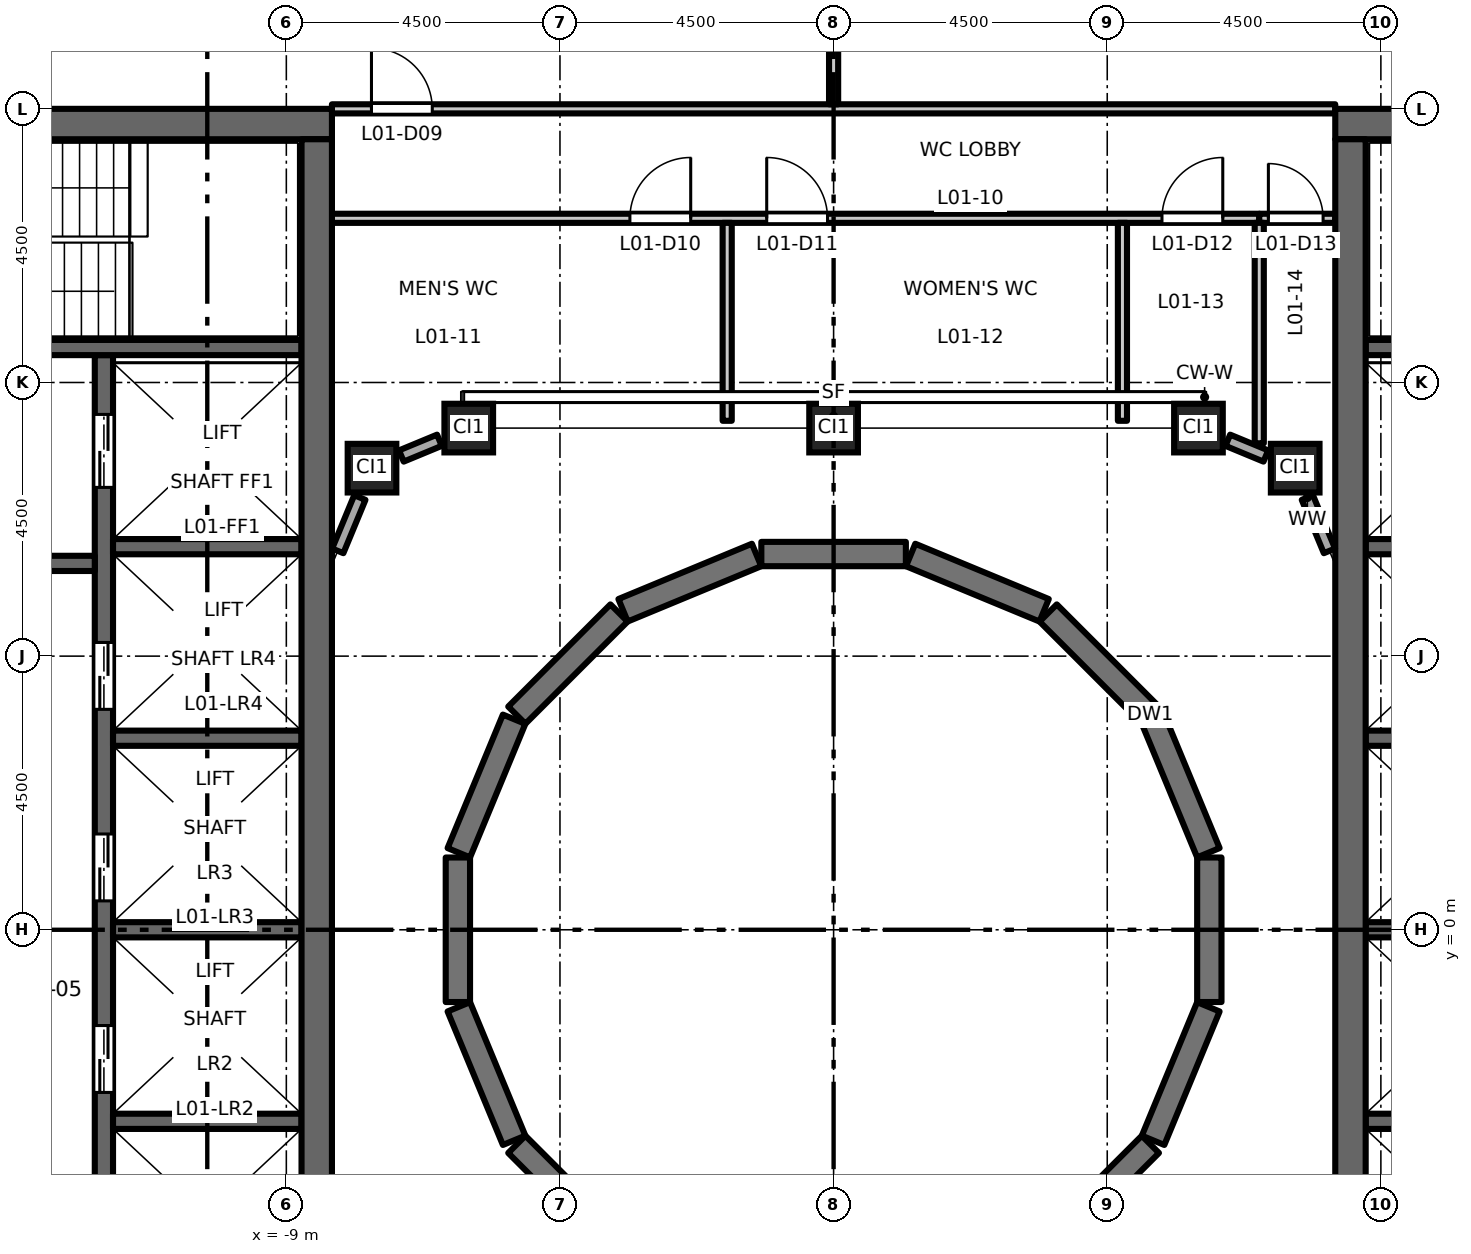
"""IFC4 building model, lengths in metres.
Left out: names, types, materials, properties, quantities, classifications, styles, units other than length and angle.
Written with IfcOpenShell. Run it as: python <this file> out.ifc"""

import sys

from ifc_helpers import new_model, si_unit, direction, frame, frame_2d, origin, origin_2d, place, context, subcontext, project, spatial, rectangle, hollow_rectangle, extrude, element, fill, save


model = new_model("IFC4")
c1 = context("Model", 3, precision=1e-05, world=origin(), true_north=direction((0.0, 1.0)))
c2 = subcontext(c1, "Body", "Model", "MODEL_VIEW")
j1 = project(units=[si_unit("LENGTHUNIT", "METRE"), si_unit("PLANEANGLEUNIT", "RADIAN")], contexts=[c1])
p1 = place(None, origin())
s1 = spatial("IfcSite", under=j1, at=p1, CompositionType="ELEMENT")
p2 = place(p1, origin())
s2 = spatial("IfcBuilding", under=s1, at=p2, CompositionType="ELEMENT")
p3 = place(p2, frame((0.0, 0.0, 7.2)))
s3 = spatial("IfcBuildingStorey", under=s2, at=p3, CompositionType="ELEMENT", Elevation=7.2)
for number, where, z_axis, x_axis in (
    (1, (-7.591, 7.591, 0.0), (0.0, 0.0, 1.0), (1.0, 0.0, 0.0)),
    (2, (-6.0, 8.25, 0.0), (0.0, 0.0, 1.0), (1.0, 0.0, 0.0)),
    (3, (0.0, 8.25, 0.0), (0.0, 0.0, 1.0), (1.0, 0.0, 0.0)),
    (4, (6.0, 8.25, 0.0), (0.0, 0.0, 1.0), (1.0, 0.0, 0.0)),
    (5, (7.591, 7.591, 0.0), (0.0, 0.0, 1.0), (1.0, 0.0, 0.0)),
):
    element("IfcColumn", number, at=place(p3, frame(where, z_axis=z_axis, x_axis=x_axis)), inside=s3, PredefinedType="COLUMN", context=c2, shape_type="SweptSolid", body=[
        extrude(hollow_rectangle(XDim=0.8, YDim=0.8, WallThickness=0.05, at=origin_2d()), origin(), (0.0, 0.0, 1.0), 5.0),
    ])
p4 = place(p3, frame((-12.0, -9.45, 0.0), z_axis=(0.0, 0.0, 1.0), x_axis=(0.0, 1.0, 0.0)))
e6 = element("IfcWall", 6, at=p4, inside=s3, PredefinedType="SHEAR", context=c2, shape_type="SweptSolid", body=[
    extrude(rectangle(XDim=18.9, YDim=0.3, at=frame_2d((9.45, 0.0))), origin(), (0.0, 0.0, 1.0), 4.8),
])
p5 = place(p4, frame((3.625, 0.0, 0.0)))
e7 = element("IfcOpeningElement", 7, at=p5, cuts=e6, PredefinedType="OPENING", context=c2, shape_type="SweptSolid", body=[
    extrude(rectangle(XDim=1.1, YDim=2.1, at=frame_2d((0.55, 1.05))), frame((0.0, 0.16, 0.0), z_axis=(0.0, -1.0, 0.0), x_axis=(1.0, 0.0, 0.0)), (0.0, 0.0, 1.0), 0.32),
])
p6 = place(p4, frame((6.775, 0.0, 0.0)))
e8 = element("IfcOpeningElement", 8, at=p6, cuts=e6, PredefinedType="OPENING", context=c2, shape_type="SweptSolid", body=[
    extrude(rectangle(XDim=1.1, YDim=2.1, at=frame_2d((0.55, 1.05))), frame((0.0, 0.16, 0.0), z_axis=(0.0, -1.0, 0.0), x_axis=(1.0, 0.0, 0.0)), (0.0, 0.0, 1.0), 0.32),
])
p7 = place(p4, frame((9.925, 0.0, 0.0)))
e9 = element("IfcOpeningElement", 9, at=p7, cuts=e6, PredefinedType="OPENING", context=c2, shape_type="SweptSolid", body=[
    extrude(rectangle(XDim=1.1, YDim=2.1, at=frame_2d((0.55, 1.05))), frame((0.0, 0.16, 0.0), z_axis=(0.0, -1.0, 0.0), x_axis=(1.0, 0.0, 0.0)), (0.0, 0.0, 1.0), 0.32),
])
p8 = place(p4, frame((13.075, 0.0, 0.0)))
e10 = element("IfcOpeningElement", 10, at=p8, cuts=e6, PredefinedType="OPENING", context=c2, shape_type="SweptSolid", body=[
    extrude(rectangle(XDim=1.1, YDim=2.1, at=frame_2d((0.55, 1.05))), frame((0.0, 0.16, 0.0), z_axis=(0.0, -1.0, 0.0), x_axis=(1.0, 0.0, 0.0)), (0.0, 0.0, 1.0), 0.32),
])
p9 = place(p4, frame((16.725, 0.0, 0.0)))
e11 = element("IfcOpeningElement", 11, at=p9, cuts=e6, PredefinedType="OPENING", context=c2, shape_type="SweptSolid", body=[
    extrude(rectangle(XDim=1.2, YDim=2.1, at=frame_2d((0.6, 1.05))), frame((0.0, 0.16, 0.0), z_axis=(0.0, -1.0, 0.0), x_axis=(1.0, 0.0, 0.0)), (0.0, 0.0, 1.0), 0.32),
])
p10 = place(p4, frame((0.975, 0.0, 0.0)))
e12 = element("IfcOpeningElement", 12, at=p10, cuts=e6, PredefinedType="OPENING", context=c2, shape_type="SweptSolid", body=[
    extrude(rectangle(XDim=1.2, YDim=2.1, at=frame_2d((0.6, 1.05))), frame((0.0, 0.16, 0.0), z_axis=(0.0, -1.0, 0.0), x_axis=(1.0, 0.0, 0.0)), (0.0, 0.0, 1.0), 0.32),
])
p11 = place(p3, frame((-12.15, 6.025, 0.0), z_axis=(0.0, 0.0, 1.0), x_axis=(-1.0, 0.0, 0.0)))
e13 = element("IfcWall", 13, at=p11, inside=s3, PredefinedType="SHEAR", context=c2, shape_type="SweptSolid", body=[
    extrude(rectangle(XDim=4.6, YDim=0.25, at=frame_2d((2.3, 0.0))), origin(), (0.0, 0.0, 1.0), 4.8),
])
p12 = place(p11, frame((1.8, 0.0, 0.0)))
e14 = element("IfcOpeningElement", 14, at=p12, cuts=e13, PredefinedType="OPENING", context=c2, shape_type="SweptSolid", body=[
    extrude(rectangle(XDim=1.0, YDim=2.1, at=frame_2d((0.5, 1.05))), frame((0.0, 0.135, 0.0), z_axis=(0.0, -1.0, 0.0), x_axis=(1.0, 0.0, 0.0)), (0.0, 0.0, 1.0), 0.27),
])
for number, where, z_axis, x_axis in (
    (15, (-8.75, 0.0, 0.0), (0.0, 0.0, 1.0), (-1.0, 0.0, 0.0)),
    (16, (-8.75, 3.15, 0.0), (0.0, 0.0, 1.0), (-1.0, 0.0, 0.0)),
    (17, (-8.75, 6.3, 0.0), (0.0, 0.0, 1.0), (-1.0, 0.0, 0.0)),
    (18, (-8.75, -3.15, 0.0), (0.0, 0.0, 1.0), (-1.0, 0.0, 0.0)),
):
    element("IfcWall", number, at=place(p3, frame(where, z_axis=z_axis, x_axis=x_axis)), inside=s3, PredefinedType="SHEAR", context=c2, shape_type="SweptSolid", body=[
        extrude(rectangle(XDim=3.1, YDim=0.25, at=frame_2d((1.55, 0.0))), origin(), (0.0, 0.0, 1.0), 4.8),
    ])
p13 = place(p3, frame((-8.75, 9.575, 0.0), z_axis=(0.0, 0.0, 1.0), x_axis=(-1.0, 0.0, 0.0)))
e19 = element("IfcWall", 19, at=p13, inside=s3, PredefinedType="SHEAR", context=c2, shape_type="SweptSolid", body=[
    extrude(rectangle(XDim=8.0, YDim=0.25, at=frame_2d((4.0, 0.0))), origin(), (0.0, 0.0, 1.0), 4.8),
])
p14 = place(p13, frame((6.65, 0.0, 0.0)))
e20 = element("IfcOpeningElement", 20, at=p14, cuts=e19, PredefinedType="OPENING", context=c2, shape_type="SweptSolid", body=[
    extrude(rectangle(XDim=1.1, YDim=2.1, at=frame_2d((0.55, 1.05))), frame((0.0, 0.135, 0.0), z_axis=(0.0, -1.0, 0.0), x_axis=(1.0, 0.0, 0.0)), (0.0, 0.0, 1.0), 0.27),
])
p15 = place(p3, frame((-8.25, 13.25, 0.0), z_axis=(0.0, 0.0, 1.0), x_axis=(-1.0, 0.0, 0.0)))
e21 = element("IfcWall", 21, at=p15, inside=s3, PredefinedType="SHEAR", context=c2, shape_type="SweptSolid", body=[
    extrude(rectangle(XDim=13.5, YDim=0.5, at=frame_2d((6.75, 0.0))), origin(), (0.0, 0.0, 1.0), 4.8),
])
p16 = place(p3, frame((-8.5, -13.0, 0.0), z_axis=(0.0, 0.0, 1.0), x_axis=(0.0, 1.0, 0.0)))
e22 = element("IfcWall", 22, at=p16, inside=s3, PredefinedType="SHEAR", context=c2, shape_type="SweptSolid", body=[
    extrude(rectangle(XDim=26.0, YDim=0.5, at=frame_2d((13.0, 0.0))), origin(), (0.0, 0.0, 1.0), 4.8),
])
for number, where, z_axis, x_axis in (
    (23, (8.75, 0.0, 0.0), (0.0, 0.0, 1.0), (1.0, 0.0, 0.0)),
    (24, (8.75, 3.15, 0.0), (0.0, 0.0, 1.0), (1.0, 0.0, 0.0)),
    (25, (8.75, 6.3, 0.0), (0.0, 0.0, 1.0), (1.0, 0.0, 0.0)),
    (26, (8.75, -3.15, 0.0), (0.0, 0.0, 1.0), (1.0, 0.0, 0.0)),
):
    element("IfcWall", number, at=place(p3, frame(where, z_axis=z_axis, x_axis=x_axis)), inside=s3, PredefinedType="SHEAR", context=c2, shape_type="SweptSolid", body=[
        extrude(rectangle(XDim=3.1, YDim=0.25, at=frame_2d((1.55, 0.0))), origin(), (0.0, 0.0, 1.0), 4.8),
    ])
p17 = place(p3, frame((8.75, 9.575, 0.0), z_axis=(0.0, 0.0, 1.0), x_axis=(1.0, 0.0, 0.0)))
e27 = element("IfcWall", 27, at=p17, inside=s3, PredefinedType="SHEAR", context=c2, shape_type="SweptSolid", body=[
    extrude(rectangle(XDim=8.0, YDim=0.25, at=frame_2d((4.0, 0.0))), origin(), (0.0, 0.0, 1.0), 4.8),
])
p18 = place(p17, frame((6.65, 0.0, 0.0)))
e28 = element("IfcOpeningElement", 28, at=p18, cuts=e27, PredefinedType="OPENING", context=c2, shape_type="SweptSolid", body=[
    extrude(rectangle(XDim=1.1, YDim=2.1, at=frame_2d((0.55, 1.05))), frame((0.0, 0.135, 0.0), z_axis=(0.0, -1.0, 0.0), x_axis=(1.0, 0.0, 0.0)), (0.0, 0.0, 1.0), 0.27),
])
p19 = place(p3, frame((8.25, 13.25, 0.0), z_axis=(0.0, 0.0, 1.0), x_axis=(1.0, 0.0, 0.0)))
e29 = element("IfcWall", 29, at=p19, inside=s3, PredefinedType="SHEAR", context=c2, shape_type="SweptSolid", body=[
    extrude(rectangle(XDim=13.5, YDim=0.5, at=frame_2d((6.75, 0.0))), origin(), (0.0, 0.0, 1.0), 4.8),
])
p20 = place(p3, frame((8.5, -13.0, 0.0), z_axis=(0.0, 0.0, 1.0), x_axis=(0.0, 1.0, 0.0)))
e30 = element("IfcWall", 30, at=p20, inside=s3, PredefinedType="SHEAR", context=c2, shape_type="SweptSolid", body=[
    extrude(rectangle(XDim=26.0, YDim=0.5, at=frame_2d((13.0, 0.0))), origin(), (0.0, 0.0, 1.0), 4.8),
])
p21 = place(p3, frame((8.154, 6.231, 0.0), z_axis=(0.0, 0.0, 1.0), x_axis=(-0.382624318388, 0.923904016107, 0.0)))
e31 = element("IfcWall", 31, at=p21, inside=s3, PredefinedType="STANDARD", context=c2, shape_type="SweptSolid", body=[
    extrude(rectangle(XDim=0.949, YDim=0.2, at=frame_2d((0.475, 0.0))), origin(), (0.0, 0.0, 1.0), 4.18),
])
for number, where, z_axis, x_axis in (
    (32, (7.108, 7.791, 0.0), (0.0, 0.0, 1.0), (-0.924, 0.383, 0.0)),
    (33, (-6.483, 8.05, 0.0), (0.0, 0.0, 1.0), (-0.924, -0.383, 0.0)),
):
    element("IfcWall", number, at=place(p3, frame(where, z_axis=z_axis, x_axis=x_axis)), inside=s3, PredefinedType="STANDARD", context=c2, shape_type="SweptSolid", body=[
        extrude(rectangle(XDim=0.677, YDim=0.2, at=frame_2d((0.338, 0.0))), origin(), (0.0, 0.0, 1.0), 4.18),
    ])
p22 = place(p3, frame((-7.791, 7.108, 0.0), z_axis=(0.0, 0.0, 1.0), x_axis=(-0.382624318388, -0.923904016107, 0.0)))
e34 = element("IfcWall", 34, at=p22, inside=s3, PredefinedType="STANDARD", context=c2, shape_type="SweptSolid", body=[
    extrude(rectangle(XDim=0.949, YDim=0.2, at=frame_2d((0.475, 0.0))), origin(), (0.0, 0.0, 1.0), 4.18),
])
p23 = place(p3, frame((6.163, 1.267, 0.0), z_axis=(0.0, 0.0, 1.0), x_axis=(-0.382681453552, 0.92388035216, 0.0)))
e35 = element("IfcWall", 35, at=p23, inside=s3, PredefinedType="SOLIDWALL", context=c2, shape_type="SweptSolid", body=[
    extrude(rectangle(XDim=2.376, YDim=0.4, at=frame_2d((1.188, 0.0))), origin(), (0.0, 0.0, 1.0), 5.0),
])
p24 = place(p3, frame((5.209, 3.529, 0.0), z_axis=(0.0, 0.0, 1.0), x_axis=(-0.707106781187, 0.707106781187, 0.0)))
e36 = element("IfcWall", 36, at=p24, inside=s3, PredefinedType="SOLIDWALL", context=c2, shape_type="SweptSolid", body=[
    extrude(rectangle(XDim=2.377, YDim=0.4, at=frame_2d((1.188, 0.0))), origin(), (0.0, 0.0, 1.0), 5.0),
])
for number, where, z_axis, x_axis in (
    (37, (3.462, 5.254, 0.0), (0.0, 0.0, 1.0), (-0.924, 0.383, 0.0)),
    (38, (1.188, 6.179, 0.0), (0.0, 0.0, 1.0), (-1.0, 0.0, 0.0)),
    (39, (-1.267, 6.163, 0.0), (0.0, 0.0, 1.0), (-0.924, -0.383, 0.0)),
):
    element("IfcWall", number, at=place(p3, frame(where, z_axis=z_axis, x_axis=x_axis)), inside=s3, PredefinedType="SOLIDWALL", context=c2, shape_type="SweptSolid", body=[
        extrude(rectangle(XDim=2.376, YDim=0.4, at=frame_2d((1.188, 0.0))), origin(), (0.0, 0.0, 1.0), 5.0),
    ])
p25 = place(p3, frame((-3.529, 5.209, 0.0), z_axis=(0.0, 0.0, 1.0), x_axis=(-0.707106781187, -0.707106781187, 0.0)))
e40 = element("IfcWall", 40, at=p25, inside=s3, PredefinedType="SOLIDWALL", context=c2, shape_type="SweptSolid", body=[
    extrude(rectangle(XDim=2.377, YDim=0.4, at=frame_2d((1.188, 0.0))), origin(), (0.0, 0.0, 1.0), 5.0),
])
for number, where, z_axis, x_axis in (
    (41, (-5.254, 3.462, 0.0), (0.0, 0.0, 1.0), (-0.383, -0.924, 0.0)),
    (42, (-6.179, 1.188, 0.0), (0.0, 0.0, 1.0), (0.0, -1.0, 0.0)),
    (43, (-6.163, -1.267, 0.0), (0.0, 0.0, 1.0), (0.383, -0.924, 0.0)),
):
    element("IfcWall", number, at=place(p3, frame(where, z_axis=z_axis, x_axis=x_axis)), inside=s3, PredefinedType="SOLIDWALL", context=c2, shape_type="SweptSolid", body=[
        extrude(rectangle(XDim=2.376, YDim=0.4, at=frame_2d((1.188, 0.0))), origin(), (0.0, 0.0, 1.0), 5.0),
    ])
for number, where, z_axis, x_axis in (
    (44, (-5.209, -3.529, 0.0), (0.0, 0.0, 1.0), (0.707, -0.707, 0.0)),
    (45, (3.529, -5.209, 0.0), (0.0, 0.0, 1.0), (0.707, 0.707, 0.0)),
):
    element("IfcWall", number, at=place(p3, frame(where, z_axis=z_axis, x_axis=x_axis)), inside=s3, PredefinedType="SOLIDWALL", context=c2, shape_type="SweptSolid", body=[
        extrude(rectangle(XDim=2.377, YDim=0.4, at=frame_2d((1.188, 0.0))), origin(), (0.0, 0.0, 1.0), 5.0),
    ])
for number, where, z_axis, x_axis in (
    (46, (5.254, -3.462, 0.0), (0.0, 0.0, 1.0), (0.383, 0.924, 0.0)),
    (47, (6.179, -1.188, 0.0), (0.0, 0.0, 1.0), (0.0, 1.0, 0.0)),
):
    element("IfcWall", number, at=place(p3, frame(where, z_axis=z_axis, x_axis=x_axis)), inside=s3, PredefinedType="SOLIDWALL", context=c2, shape_type="SweptSolid", body=[
        extrude(rectangle(XDim=2.376, YDim=0.4, at=frame_2d((1.188, 0.0))), origin(), (0.0, 0.0, 1.0), 5.0),
    ])
p26 = place(p3, frame((-8.25, 11.7, 0.0), z_axis=(0.0, 0.0, 1.0), x_axis=(1.0, 0.0, 0.0)))
e48 = element("IfcWall", 48, at=p26, inside=s3, PredefinedType="PARTITIONING", context=c2, shape_type="SweptSolid", body=[
    extrude(rectangle(XDim=15.25, YDim=0.15, at=frame_2d((7.625, 0.0))), origin(), (0.0, 0.0, 1.0), 4.8),
])
p27 = place(p26, frame((4.9, 0.0, 0.0)))
e49 = element("IfcOpeningElement", 49, at=p27, cuts=e48, PredefinedType="OPENING", context=c2, shape_type="SweptSolid", body=[
    extrude(rectangle(XDim=1.0, YDim=2.1, at=frame_2d((0.5, 1.05))), frame((0.0, 0.085, 0.0), z_axis=(0.0, -1.0, 0.0), x_axis=(1.0, 0.0, 0.0)), (0.0, 0.0, 1.0), 0.17),
])
p28 = place(p26, frame((7.15, 0.0, 0.0)))
e50 = element("IfcOpeningElement", 50, at=p28, cuts=e48, PredefinedType="OPENING", context=c2, shape_type="SweptSolid", body=[
    extrude(rectangle(XDim=1.0, YDim=2.1, at=frame_2d((0.5, 1.05))), frame((0.0, 0.085, 0.0), z_axis=(0.0, -1.0, 0.0), x_axis=(1.0, 0.0, 0.0)), (0.0, 0.0, 1.0), 0.17),
])
p29 = place(p26, frame((13.65, 0.0, 0.0)))
e51 = element("IfcOpeningElement", 51, at=p29, cuts=e48, PredefinedType="OPENING", context=c2, shape_type="SweptSolid", body=[
    extrude(rectangle(XDim=1.0, YDim=2.1, at=frame_2d((0.5, 1.05))), frame((0.0, 0.085, 0.0), z_axis=(0.0, -1.0, 0.0), x_axis=(1.0, 0.0, 0.0)), (0.0, 0.0, 1.0), 0.17),
])
p30 = place(p3, frame((7.0, 11.7, 0.0), z_axis=(0.0, 0.0, 1.0), x_axis=(1.0, 0.0, 0.0)))
e52 = element("IfcWall", 52, at=p30, inside=s3, PredefinedType="PARTITIONING", context=c2, shape_type="SweptSolid", body=[
    extrude(rectangle(XDim=1.25, YDim=0.15, at=frame_2d((0.625, 0.0))), origin(), (0.0, 0.0, 1.0), 4.8),
])
p31 = place(p30, frame((0.15, 0.0, 0.0)))
e53 = element("IfcOpeningElement", 53, at=p31, cuts=e52, PredefinedType="OPENING", context=c2, shape_type="SweptSolid", body=[
    extrude(rectangle(XDim=0.9, YDim=2.1, at=frame_2d((0.45, 1.05))), frame((0.0, 0.085, 0.0), z_axis=(0.0, -1.0, 0.0), x_axis=(1.0, 0.0, 0.0)), (0.0, 0.0, 1.0), 0.17),
])
p32 = place(p3, frame((-8.25, 13.5, 0.0), z_axis=(0.0, 0.0, 1.0), x_axis=(1.0, 0.0, 0.0)))
e54 = element("IfcWall", 54, at=p32, inside=s3, PredefinedType="PARTITIONING", context=c2, shape_type="SweptSolid", body=[
    extrude(rectangle(XDim=16.5, YDim=0.15, at=frame_2d((8.25, 0.0))), origin(), (0.0, 0.0, 1.0), 4.3),
])
p33 = place(p32, frame((0.65, 0.0, 0.0)))
e55 = element("IfcOpeningElement", 55, at=p33, cuts=e54, PredefinedType="OPENING", context=c2, shape_type="SweptSolid", body=[
    extrude(rectangle(XDim=1.0, YDim=2.1, at=frame_2d((0.5, 1.05))), frame((0.0, 0.085, 0.0), z_axis=(0.0, -1.0, 0.0), x_axis=(1.0, 0.0, 0.0)), (0.0, 0.0, 1.0), 0.17),
])
p34 = place(p3, frame((-1.75, 8.37, 0.0), z_axis=(0.0, 0.0, 1.0), x_axis=(0.0, 1.0, 0.0)))
e56 = element("IfcWall", 56, at=p34, inside=s3, PredefinedType="PARTITIONING", context=c2, shape_type="SweptSolid", body=[
    extrude(rectangle(XDim=3.255, YDim=0.15, at=frame_2d((1.627, 0.0))), origin(), (0.0, 0.0, 1.0), 4.8),
])
p35 = place(p3, frame((0.0, 13.575, 0.0), z_axis=(0.0, 0.0, 1.0), x_axis=(0.0, 1.0, 0.0)))
e57 = element("IfcWall", 57, at=p35, inside=s3, PredefinedType="PARTITIONING", context=c2, shape_type="SweptSolid", body=[
    extrude(rectangle(XDim=7.35, YDim=0.15, at=frame_2d((3.675, 0.0))), origin(), (0.0, 0.0, 1.0), 4.8),
])
p36 = place(p35, frame((5.775, 0.0, 0.0)))
e58 = element("IfcOpeningElement", 58, at=p36, cuts=e57, PredefinedType="OPENING", context=c2, shape_type="SweptSolid", body=[
    extrude(rectangle(XDim=1.0, YDim=2.1, at=frame_2d((0.5, 1.05))), frame((0.0, 0.085, 0.0), z_axis=(0.0, -1.0, 0.0), x_axis=(1.0, 0.0, 0.0)), (0.0, 0.0, 1.0), 0.17),
])
p37 = place(p3, frame((4.75, 8.37, 0.0), z_axis=(0.0, 0.0, 1.0), x_axis=(0.0, 1.0, 0.0)))
e59 = element("IfcWall", 59, at=p37, inside=s3, PredefinedType="PARTITIONING", context=c2, shape_type="SweptSolid", body=[
    extrude(rectangle(XDim=3.255, YDim=0.15, at=frame_2d((1.627, 0.0))), origin(), (0.0, 0.0, 1.0), 4.8),
])
p38 = place(p3, frame((7.0, 8.0, 0.0), z_axis=(0.0, 0.0, 1.0), x_axis=(0.0, 1.0, 0.0)))
e60 = element("IfcWall", 60, at=p38, inside=s3, PredefinedType="PARTITIONING", context=c2, shape_type="SweptSolid", body=[
    extrude(rectangle(XDim=3.625, YDim=0.15, at=frame_2d((1.812, 0.0))), origin(), (0.0, 0.0, 1.0), 4.8),
])
p39 = place(p6, origin())
e61 = element("IfcDoor", 61, at=p39, inside=s3, OperationType="DOUBLE_DOOR_SLIDING", PredefinedType="DOOR", context=c2, shape_type="SweptSolid", body=[
    extrude(rectangle(XDim=1.1, YDim=2.1, at=frame_2d((0.55, 1.05))), frame((0.0, 0.025, 0.0), z_axis=(0.0, -1.0, 0.0), x_axis=(1.0, 0.0, 0.0)), (0.0, 0.0, 1.0), 0.05),
])
fill(e8, e61)
p40 = place(p7, origin())
e62 = element("IfcDoor", 62, at=p40, inside=s3, OperationType="DOUBLE_DOOR_SLIDING", PredefinedType="DOOR", context=c2, shape_type="SweptSolid", body=[
    extrude(rectangle(XDim=1.1, YDim=2.1, at=frame_2d((0.55, 1.05))), frame((0.0, 0.025, 0.0), z_axis=(0.0, -1.0, 0.0), x_axis=(1.0, 0.0, 0.0)), (0.0, 0.0, 1.0), 0.05),
])
fill(e9, e62)
p41 = place(p8, origin())
e63 = element("IfcDoor", 63, at=p41, inside=s3, OperationType="DOUBLE_DOOR_SLIDING", PredefinedType="DOOR", context=c2, shape_type="SweptSolid", body=[
    extrude(rectangle(XDim=1.1, YDim=2.1, at=frame_2d((0.55, 1.05))), frame((0.0, 0.025, 0.0), z_axis=(0.0, -1.0, 0.0), x_axis=(1.0, 0.0, 0.0)), (0.0, 0.0, 1.0), 0.05),
])
fill(e10, e63)
p42 = place(p9, origin())
e64 = element("IfcDoor", 64, at=p42, inside=s3, OperationType="DOUBLE_DOOR_SLIDING", PredefinedType="DOOR", context=c2, shape_type="SweptSolid", body=[
    extrude(rectangle(XDim=1.2, YDim=2.1, at=frame_2d((0.6, 1.05))), frame((0.0, 0.025, 0.0), z_axis=(0.0, -1.0, 0.0), x_axis=(1.0, 0.0, 0.0)), (0.0, 0.0, 1.0), 0.05),
])
fill(e11, e64)
p43 = place(p33, origin())
e65 = element("IfcDoor", 65, at=p43, inside=s3, OperationType="SINGLE_SWING_LEFT", PredefinedType="DOOR", context=c2, shape_type="SweptSolid", body=[
    extrude(rectangle(XDim=1.0, YDim=2.1, at=frame_2d((0.5, 1.05))), frame((0.0, 0.025, 0.0), z_axis=(0.0, -1.0, 0.0), x_axis=(1.0, 0.0, 0.0)), (0.0, 0.0, 1.0), 0.05),
])
fill(e55, e65)
p44 = place(p27, origin())
e66 = element("IfcDoor", 66, at=p44, inside=s3, OperationType="SINGLE_SWING_RIGHT", PredefinedType="DOOR", context=c2, shape_type="SweptSolid", body=[
    extrude(rectangle(XDim=1.0, YDim=2.1, at=frame_2d((0.5, 1.05))), frame((0.0, 0.025, 0.0), z_axis=(0.0, -1.0, 0.0), x_axis=(1.0, 0.0, 0.0)), (0.0, 0.0, 1.0), 0.05),
])
fill(e49, e66)
p45 = place(p28, origin())
e67 = element("IfcDoor", 67, at=p45, inside=s3, OperationType="SINGLE_SWING_LEFT", PredefinedType="DOOR", context=c2, shape_type="SweptSolid", body=[
    extrude(rectangle(XDim=1.0, YDim=2.1, at=frame_2d((0.5, 1.05))), frame((0.0, 0.025, 0.0), z_axis=(0.0, -1.0, 0.0), x_axis=(1.0, 0.0, 0.0)), (0.0, 0.0, 1.0), 0.05),
])
fill(e50, e67)
p46 = place(p29, origin())
e68 = element("IfcDoor", 68, at=p46, inside=s3, OperationType="SINGLE_SWING_RIGHT", PredefinedType="DOOR", context=c2, shape_type="SweptSolid", body=[
    extrude(rectangle(XDim=1.0, YDim=2.1, at=frame_2d((0.5, 1.05))), frame((0.0, 0.025, 0.0), z_axis=(0.0, -1.0, 0.0), x_axis=(1.0, 0.0, 0.0)), (0.0, 0.0, 1.0), 0.05),
])
fill(e51, e68)
p47 = place(p31, origin())
e69 = element("IfcDoor", 69, at=p47, inside=s3, OperationType="SINGLE_SWING_LEFT", PredefinedType="DOOR", context=c2, shape_type="SweptSolid", body=[
    extrude(rectangle(XDim=0.9, YDim=2.1, at=frame_2d((0.45, 1.05))), frame((0.0, 0.025, 0.0), z_axis=(0.0, -1.0, 0.0), x_axis=(1.0, 0.0, 0.0)), (0.0, 0.0, 1.0), 0.05),
])
fill(e53, e69)
save(model, sys.argv[1])
